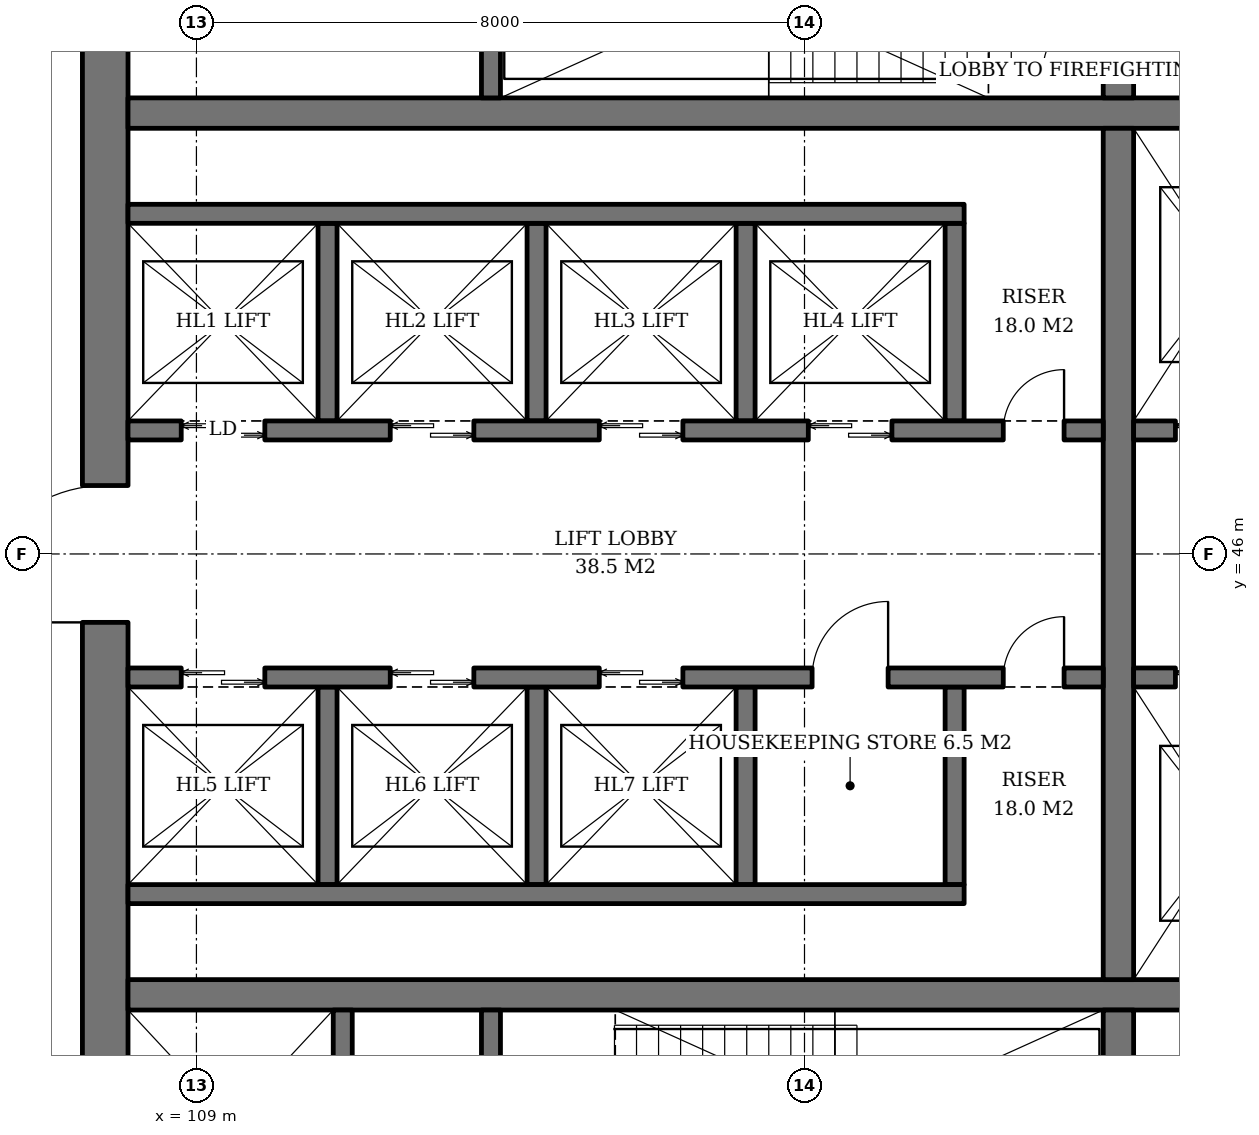
"""IFC4 building model, lengths in metres.
Left out: names, types, materials, properties, quantities, classifications, styles, units other than length and angle.
Written with IfcOpenShell. Run it as: python <this file> out.ifc"""

import sys

from ifc_helpers import new_model, si_unit, direction, frame, frame_2d, origin, place, context, subcontext, project, spatial, rectangle, extrude, element, fill, save


model = new_model("IFC4")
c1 = context("Model", 3, precision=1e-05, world=origin(), true_north=direction((0.0, 1.0)))
c2 = subcontext(c1, "Body", "Model", "MODEL_VIEW")
j1 = project(units=[si_unit("LENGTHUNIT", "METRE"), si_unit("PLANEANGLEUNIT", "RADIAN")], contexts=[c1])
p1 = place(None, origin())
s1 = spatial("IfcSite", under=j1, at=p1, CompositionType="ELEMENT")
p2 = place(p1, origin())
s2 = spatial("IfcBuilding", under=s1, at=p2, CompositionType="ELEMENT")
p3 = place(p2, frame((0.0, 0.0, 104.6)))
s3 = spatial("IfcBuildingStorey", under=s2, at=p3, CompositionType="ELEMENT", Elevation=104.6)
p4 = place(p3, frame((107.8, 37.1, 0.0), z_axis=(0.0, 0.0, 1.0), x_axis=(0.0, 1.0, 0.0)))
e1 = element("IfcWall", 1, at=p4, inside=s3, PredefinedType="SHEAR", context=c2, shape_type="SweptSolid", body=[
    extrude(rectangle(XDim=17.8, YDim=0.6, at=frame_2d((8.9, 0.0))), origin(), (0.0, 0.0, 1.0), 3.8),
])
p5 = place(p4, frame((8.0, 0.0, 0.0)))
e2 = element("IfcOpeningElement", 2, at=p5, cuts=e1, PredefinedType="OPENING", context=c2, shape_type="SweptSolid", body=[
    extrude(rectangle(XDim=1.8, YDim=2.4, at=frame_2d((0.9, 1.2))), frame((0.0, 0.31, 0.0), z_axis=(0.0, -1.0, 0.0), x_axis=(1.0, 0.0, 0.0)), (0.0, 0.0, 1.0), 0.62),
])
for number, where, z_axis, x_axis in (
    (3, (108.1, 40.2, 0.0), (0.0, 0.0, 1.0), (1.0, 0.0, 0.0)),
    (4, (108.1, 51.8, 0.0), (0.0, 0.0, 1.0), (1.0, 0.0, 0.0)),
):
    element("IfcWall", number, at=place(p3, frame(where, z_axis=z_axis, x_axis=x_axis)), inside=s3, PredefinedType="SHEAR", context=c2, shape_type="SweptSolid", body=[
        extrude(rectangle(XDim=17.8, YDim=0.4, at=frame_2d((8.9, 0.0))), origin(), (0.0, 0.0, 1.0), 3.8),
    ])
p6 = place(p3, frame((121.13, 37.1, 0.0), z_axis=(0.0, 0.0, 1.0), x_axis=(0.0, 1.0, 0.0)))
e5 = element("IfcWall", 5, at=p6, inside=s3, PredefinedType="SHEAR", context=c2, shape_type="SweptSolid", body=[
    extrude(rectangle(XDim=2.9, YDim=0.4, at=frame_2d((1.45, 0.0))), origin(), (0.0, 0.0, 1.0), 3.8),
])
p7 = place(p3, frame((121.13, 40.4, 0.0), z_axis=(0.0, 0.0, 1.0), x_axis=(0.0, 1.0, 0.0)))
e6 = element("IfcWall", 6, at=p7, inside=s3, PredefinedType="SHEAR", context=c2, shape_type="SweptSolid", body=[
    extrude(rectangle(XDim=11.2, YDim=0.4, at=frame_2d((5.6, 0.0))), origin(), (0.0, 0.0, 1.0), 3.8),
])
p8 = place(p3, frame((121.13, 52.0, 0.0), z_axis=(0.0, 0.0, 1.0), x_axis=(0.0, 1.0, 0.0)))
e7 = element("IfcWall", 7, at=p8, inside=s3, PredefinedType="SHEAR", context=c2, shape_type="SweptSolid", body=[
    extrude(rectangle(XDim=2.9, YDim=0.4, at=frame_2d((1.45, 0.0))), origin(), (0.0, 0.0, 1.0), 3.8),
])
p9 = place(p8, frame((0.3, 0.0, 0.0)))
e8 = element("IfcOpeningElement", 8, at=p9, cuts=e7, PredefinedType="OPENING", context=c2, shape_type="SweptSolid", body=[
    extrude(rectangle(XDim=1.0, YDim=2.1, at=frame_2d((0.5, 1.05))), frame((0.0, 0.21, 0.0), z_axis=(0.0, -1.0, 0.0), x_axis=(1.0, 0.0, 0.0)), (0.0, 0.0, 1.0), 0.42),
])
p10 = place(p3, frame((110.925, 37.1, 0.0), z_axis=(0.0, 0.0, 1.0), x_axis=(0.0, 1.0, 0.0)))
e9 = element("IfcWall", 9, at=p10, inside=s3, PredefinedType="SHEAR", context=c2, shape_type="SweptSolid", body=[
    extrude(rectangle(XDim=2.9, YDim=0.25, at=frame_2d((1.45, 0.0))), origin(), (0.0, 0.0, 1.0), 3.8),
])
p11 = place(p10, frame((0.8, 0.0, 0.0)))
e10 = element("IfcOpeningElement", 10, at=p11, cuts=e9, PredefinedType="OPENING", context=c2, shape_type="SweptSolid", body=[
    extrude(rectangle(XDim=1.3, YDim=2.2, at=frame_2d((0.65, 1.1))), frame((0.0, 0.135, 0.0), z_axis=(0.0, -1.0, 0.0), x_axis=(1.0, 0.0, 0.0)), (0.0, 0.0, 1.0), 0.27),
])
p12 = place(p3, frame((112.875, 37.1, 0.0), z_axis=(0.0, 0.0, 1.0), x_axis=(0.0, 1.0, 0.0)))
e11 = element("IfcWall", 11, at=p12, inside=s3, PredefinedType="SHEAR", context=c2, shape_type="SweptSolid", body=[
    extrude(rectangle(XDim=2.9, YDim=0.25, at=frame_2d((1.45, 0.0))), origin(), (0.0, 0.0, 1.0), 3.8),
])
p13 = place(p12, frame((0.75, 0.0, 0.0)))
e12 = element("IfcOpeningElement", 12, at=p13, cuts=e11, PredefinedType="OPENING", context=c2, shape_type="SweptSolid", body=[
    extrude(rectangle(XDim=1.2, YDim=2.1, at=frame_2d((0.6, 1.05))), frame((0.0, 0.135, 0.0), z_axis=(0.0, -1.0, 0.0), x_axis=(1.0, 0.0, 0.0)), (0.0, 0.0, 1.0), 0.27),
])
p14 = place(p3, frame((112.875, 52.0, 0.0), z_axis=(0.0, 0.0, 1.0), x_axis=(0.0, 1.0, 0.0)))
e13 = element("IfcWall", 13, at=p14, inside=s3, PredefinedType="SHEAR", context=c2, shape_type="SweptSolid", body=[
    extrude(rectangle(XDim=2.9, YDim=0.25, at=frame_2d((1.45, 0.0))), origin(), (0.0, 0.0, 1.0), 3.8),
])
for number, where, z_axis, x_axis in (
    (14, (110.725, 47.75, 0.0), (0.0, 0.0, 1.0), (0.0, 1.0, 0.0)),
    (15, (113.475, 47.75, 0.0), (0.0, 0.0, 1.0), (0.0, 1.0, 0.0)),
    (16, (116.225, 47.75, 0.0), (0.0, 0.0, 1.0), (0.0, 1.0, 0.0)),
    (17, (118.975, 47.75, 0.0), (0.0, 0.0, 1.0), (0.0, 1.0, 0.0)),
):
    element("IfcWall", number, at=place(p3, frame(where, z_axis=z_axis, x_axis=x_axis)), inside=s3, PredefinedType="SHEAR", context=c2, shape_type="SweptSolid", body=[
        extrude(rectangle(XDim=2.6, YDim=0.25, at=frame_2d((1.3, 0.0))), origin(), (0.0, 0.0, 1.0), 3.8),
    ])
p15 = place(p3, frame((108.1, 50.475, 0.0), z_axis=(0.0, 0.0, 1.0), x_axis=(1.0, 0.0, 0.0)))
e18 = element("IfcWall", 18, at=p15, inside=s3, PredefinedType="SHEAR", context=c2, shape_type="SweptSolid", body=[
    extrude(rectangle(XDim=11.0, YDim=0.25, at=frame_2d((5.5, 0.0))), origin(), (0.0, 0.0, 1.0), 3.8),
])
p16 = place(p3, frame((108.1, 47.625, 0.0), z_axis=(0.0, 0.0, 1.0), x_axis=(1.0, 0.0, 0.0)))
e19 = element("IfcWall", 19, at=p16, inside=s3, PredefinedType="SHEAR", context=c2, shape_type="SweptSolid", body=[
    extrude(rectangle(XDim=12.83, YDim=0.25, at=frame_2d((6.415, 0.0))), origin(), (0.0, 0.0, 1.0), 3.8),
])
p17 = place(p16, frame((0.7, 0.0, 0.0)))
e20 = element("IfcOpeningElement", 20, at=p17, cuts=e19, PredefinedType="OPENING", context=c2, shape_type="SweptSolid", body=[
    extrude(rectangle(XDim=1.1, YDim=2.2, at=frame_2d((0.55, 1.1))), frame((0.0, 0.135, 0.0), z_axis=(0.0, -1.0, 0.0), x_axis=(1.0, 0.0, 0.0)), (0.0, 0.0, 1.0), 0.27),
])
p18 = place(p16, frame((3.45, 0.0, 0.0)))
e21 = element("IfcOpeningElement", 21, at=p18, cuts=e19, PredefinedType="OPENING", context=c2, shape_type="SweptSolid", body=[
    extrude(rectangle(XDim=1.1, YDim=2.2, at=frame_2d((0.55, 1.1))), frame((0.0, 0.135, 0.0), z_axis=(0.0, -1.0, 0.0), x_axis=(1.0, 0.0, 0.0)), (0.0, 0.0, 1.0), 0.27),
])
p19 = place(p16, frame((6.2, 0.0, 0.0)))
e22 = element("IfcOpeningElement", 22, at=p19, cuts=e19, PredefinedType="OPENING", context=c2, shape_type="SweptSolid", body=[
    extrude(rectangle(XDim=1.1, YDim=2.2, at=frame_2d((0.55, 1.1))), frame((0.0, 0.135, 0.0), z_axis=(0.0, -1.0, 0.0), x_axis=(1.0, 0.0, 0.0)), (0.0, 0.0, 1.0), 0.27),
])
p20 = place(p16, frame((8.95, 0.0, 0.0)))
e23 = element("IfcOpeningElement", 23, at=p20, cuts=e19, PredefinedType="OPENING", context=c2, shape_type="SweptSolid", body=[
    extrude(rectangle(XDim=1.1, YDim=2.2, at=frame_2d((0.55, 1.1))), frame((0.0, 0.135, 0.0), z_axis=(0.0, -1.0, 0.0), x_axis=(1.0, 0.0, 0.0)), (0.0, 0.0, 1.0), 0.27),
])
p21 = place(p16, frame((11.515, 0.0, 0.0)))
e24 = element("IfcOpeningElement", 24, at=p21, cuts=e19, PredefinedType="OPENING", context=c2, shape_type="SweptSolid", body=[
    extrude(rectangle(XDim=0.8, YDim=2.0, at=frame_2d((0.4, 1.0))), frame((0.0, 0.135, 0.0), z_axis=(0.0, -1.0, 0.0), x_axis=(1.0, 0.0, 0.0)), (0.0, 0.0, 1.0), 0.27),
])
for number, where, z_axis, x_axis in (
    (25, (110.725, 44.25, 0.0), (0.0, 0.0, 1.0), (0.0, -1.0, 0.0)),
    (26, (113.475, 44.25, 0.0), (0.0, 0.0, 1.0), (0.0, -1.0, 0.0)),
    (27, (116.225, 44.25, 0.0), (0.0, 0.0, 1.0), (0.0, -1.0, 0.0)),
    (28, (118.975, 44.25, 0.0), (0.0, 0.0, 1.0), (0.0, -1.0, 0.0)),
):
    element("IfcWall", number, at=place(p3, frame(where, z_axis=z_axis, x_axis=x_axis)), inside=s3, PredefinedType="SHEAR", context=c2, shape_type="SweptSolid", body=[
        extrude(rectangle(XDim=2.6, YDim=0.25, at=frame_2d((1.3, 0.0))), origin(), (0.0, 0.0, 1.0), 3.8),
    ])
p22 = place(p3, frame((108.1, 41.525, 0.0), z_axis=(0.0, 0.0, 1.0), x_axis=(1.0, 0.0, 0.0)))
e29 = element("IfcWall", 29, at=p22, inside=s3, PredefinedType="SHEAR", context=c2, shape_type="SweptSolid", body=[
    extrude(rectangle(XDim=11.0, YDim=0.25, at=frame_2d((5.5, 0.0))), origin(), (0.0, 0.0, 1.0), 3.8),
])
p23 = place(p3, frame((108.1, 44.375, 0.0), z_axis=(0.0, 0.0, 1.0), x_axis=(1.0, 0.0, 0.0)))
e30 = element("IfcWall", 30, at=p23, inside=s3, PredefinedType="SHEAR", context=c2, shape_type="SweptSolid", body=[
    extrude(rectangle(XDim=12.83, YDim=0.25, at=frame_2d((6.415, 0.0))), origin(), (0.0, 0.0, 1.0), 3.8),
])
p24 = place(p23, frame((0.7, 0.0, 0.0)))
e31 = element("IfcOpeningElement", 31, at=p24, cuts=e30, PredefinedType="OPENING", context=c2, shape_type="SweptSolid", body=[
    extrude(rectangle(XDim=1.1, YDim=2.2, at=frame_2d((0.55, 1.1))), frame((0.0, 0.135, 0.0), z_axis=(0.0, -1.0, 0.0), x_axis=(1.0, 0.0, 0.0)), (0.0, 0.0, 1.0), 0.27),
])
p25 = place(p23, frame((3.45, 0.0, 0.0)))
e32 = element("IfcOpeningElement", 32, at=p25, cuts=e30, PredefinedType="OPENING", context=c2, shape_type="SweptSolid", body=[
    extrude(rectangle(XDim=1.1, YDim=2.2, at=frame_2d((0.55, 1.1))), frame((0.0, 0.135, 0.0), z_axis=(0.0, -1.0, 0.0), x_axis=(1.0, 0.0, 0.0)), (0.0, 0.0, 1.0), 0.27),
])
p26 = place(p23, frame((6.2, 0.0, 0.0)))
e33 = element("IfcOpeningElement", 33, at=p26, cuts=e30, PredefinedType="OPENING", context=c2, shape_type="SweptSolid", body=[
    extrude(rectangle(XDim=1.1, YDim=2.2, at=frame_2d((0.55, 1.1))), frame((0.0, 0.135, 0.0), z_axis=(0.0, -1.0, 0.0), x_axis=(1.0, 0.0, 0.0)), (0.0, 0.0, 1.0), 0.27),
])
p27 = place(p23, frame((9.0, 0.0, 0.0)))
e34 = element("IfcOpeningElement", 34, at=p27, cuts=e30, PredefinedType="OPENING", context=c2, shape_type="SweptSolid", body=[
    extrude(rectangle(XDim=1.0, YDim=2.1, at=frame_2d((0.5, 1.05))), frame((0.0, 0.135, 0.0), z_axis=(0.0, -1.0, 0.0), x_axis=(1.0, 0.0, 0.0)), (0.0, 0.0, 1.0), 0.27),
])
p28 = place(p23, frame((11.515, 0.0, 0.0)))
e35 = element("IfcOpeningElement", 35, at=p28, cuts=e30, PredefinedType="OPENING", context=c2, shape_type="SweptSolid", body=[
    extrude(rectangle(XDim=0.8, YDim=2.0, at=frame_2d((0.4, 1.0))), frame((0.0, 0.135, 0.0), z_axis=(0.0, -1.0, 0.0), x_axis=(1.0, 0.0, 0.0)), (0.0, 0.0, 1.0), 0.27),
])
p29 = place(p3, frame((121.33, 47.625, 0.0), z_axis=(0.0, 0.0, 1.0), x_axis=(1.0, 0.0, 0.0)))
e36 = element("IfcWall", 36, at=p29, inside=s3, PredefinedType="SHEAR", context=c2, shape_type="SweptSolid", body=[
    extrude(rectangle(XDim=4.57, YDim=0.25, at=frame_2d((2.285, 0.0))), origin(), (0.0, 0.0, 1.0), 3.8),
])
p30 = place(p29, frame((0.55, 0.0, 0.0)))
e37 = element("IfcOpeningElement", 37, at=p30, cuts=e36, PredefinedType="OPENING", context=c2, shape_type="SweptSolid", body=[
    extrude(rectangle(XDim=1.4, YDim=2.4, at=frame_2d((0.7, 1.2))), frame((0.0, 0.135, 0.0), z_axis=(0.0, -1.0, 0.0), x_axis=(1.0, 0.0, 0.0)), (0.0, 0.0, 1.0), 0.27),
])
p31 = place(p29, frame((3.26, 0.0, 0.0)))
e38 = element("IfcOpeningElement", 38, at=p31, cuts=e36, PredefinedType="OPENING", context=c2, shape_type="SweptSolid", body=[
    extrude(rectangle(XDim=0.8, YDim=2.0, at=frame_2d((0.4, 1.0))), frame((0.0, 0.135, 0.0), z_axis=(0.0, -1.0, 0.0), x_axis=(1.0, 0.0, 0.0)), (0.0, 0.0, 1.0), 0.27),
])
p32 = place(p3, frame((121.33, 44.375, 0.0), z_axis=(0.0, 0.0, 1.0), x_axis=(1.0, 0.0, 0.0)))
e39 = element("IfcWall", 39, at=p32, inside=s3, PredefinedType="SHEAR", context=c2, shape_type="SweptSolid", body=[
    extrude(rectangle(XDim=4.57, YDim=0.25, at=frame_2d((2.285, 0.0))), origin(), (0.0, 0.0, 1.0), 3.8),
])
p33 = place(p32, frame((0.55, 0.0, 0.0)))
e40 = element("IfcOpeningElement", 40, at=p33, cuts=e39, PredefinedType="OPENING", context=c2, shape_type="SweptSolid", body=[
    extrude(rectangle(XDim=1.4, YDim=2.4, at=frame_2d((0.7, 1.2))), frame((0.0, 0.135, 0.0), z_axis=(0.0, -1.0, 0.0), x_axis=(1.0, 0.0, 0.0)), (0.0, 0.0, 1.0), 0.27),
])
p34 = place(p32, frame((3.26, 0.0, 0.0)))
e41 = element("IfcOpeningElement", 41, at=p34, cuts=e39, PredefinedType="OPENING", context=c2, shape_type="SweptSolid", body=[
    extrude(rectangle(XDim=0.8, YDim=2.0, at=frame_2d((0.4, 1.0))), frame((0.0, 0.135, 0.0), z_axis=(0.0, -1.0, 0.0), x_axis=(1.0, 0.0, 0.0)), (0.0, 0.0, 1.0), 0.27),
])
p35 = place(p17, origin())
e42 = element("IfcDoor", 42, at=p35, inside=s3, OperationType="DOUBLE_DOOR_SLIDING", PredefinedType="DOOR", context=c2, shape_type="SweptSolid", body=[
    extrude(rectangle(XDim=1.1, YDim=2.2, at=frame_2d((0.55, 1.1))), frame((0.0, 0.025, 0.0), z_axis=(0.0, -1.0, 0.0), x_axis=(1.0, 0.0, 0.0)), (0.0, 0.0, 1.0), 0.05),
])
fill(e20, e42)
p36 = place(p18, origin())
e43 = element("IfcDoor", 43, at=p36, inside=s3, OperationType="DOUBLE_DOOR_SLIDING", PredefinedType="DOOR", context=c2, shape_type="SweptSolid", body=[
    extrude(rectangle(XDim=1.1, YDim=2.2, at=frame_2d((0.55, 1.1))), frame((0.0, 0.025, 0.0), z_axis=(0.0, -1.0, 0.0), x_axis=(1.0, 0.0, 0.0)), (0.0, 0.0, 1.0), 0.05),
])
fill(e21, e43)
p37 = place(p19, origin())
e44 = element("IfcDoor", 44, at=p37, inside=s3, OperationType="DOUBLE_DOOR_SLIDING", PredefinedType="DOOR", context=c2, shape_type="SweptSolid", body=[
    extrude(rectangle(XDim=1.1, YDim=2.2, at=frame_2d((0.55, 1.1))), frame((0.0, 0.025, 0.0), z_axis=(0.0, -1.0, 0.0), x_axis=(1.0, 0.0, 0.0)), (0.0, 0.0, 1.0), 0.05),
])
fill(e22, e44)
p38 = place(p20, origin())
e45 = element("IfcDoor", 45, at=p38, inside=s3, OperationType="DOUBLE_DOOR_SLIDING", PredefinedType="DOOR", context=c2, shape_type="SweptSolid", body=[
    extrude(rectangle(XDim=1.1, YDim=2.2, at=frame_2d((0.55, 1.1))), frame((0.0, 0.025, 0.0), z_axis=(0.0, -1.0, 0.0), x_axis=(1.0, 0.0, 0.0)), (0.0, 0.0, 1.0), 0.05),
])
fill(e23, e45)
p39 = place(p21, origin())
e46 = element("IfcDoor", 46, at=p39, inside=s3, OperationType="SINGLE_SWING_RIGHT", PredefinedType="DOOR", context=c2, shape_type="SweptSolid", body=[
    extrude(rectangle(XDim=0.8, YDim=2.0, at=frame_2d((0.4, 1.0))), frame((0.0, 0.025, 0.0), z_axis=(0.0, -1.0, 0.0), x_axis=(1.0, 0.0, 0.0)), (0.0, 0.0, 1.0), 0.05),
])
fill(e24, e46)
p40 = place(p24, origin())
e47 = element("IfcDoor", 47, at=p40, inside=s3, OperationType="DOUBLE_DOOR_SLIDING", PredefinedType="DOOR", context=c2, shape_type="SweptSolid", body=[
    extrude(rectangle(XDim=1.1, YDim=2.2, at=frame_2d((0.55, 1.1))), frame((0.0, 0.025, 0.0), z_axis=(0.0, -1.0, 0.0), x_axis=(1.0, 0.0, 0.0)), (0.0, 0.0, 1.0), 0.05),
])
fill(e31, e47)
p41 = place(p25, origin())
e48 = element("IfcDoor", 48, at=p41, inside=s3, OperationType="DOUBLE_DOOR_SLIDING", PredefinedType="DOOR", context=c2, shape_type="SweptSolid", body=[
    extrude(rectangle(XDim=1.1, YDim=2.2, at=frame_2d((0.55, 1.1))), frame((0.0, 0.025, 0.0), z_axis=(0.0, -1.0, 0.0), x_axis=(1.0, 0.0, 0.0)), (0.0, 0.0, 1.0), 0.05),
])
fill(e32, e48)
p42 = place(p26, origin())
e49 = element("IfcDoor", 49, at=p42, inside=s3, OperationType="DOUBLE_DOOR_SLIDING", PredefinedType="DOOR", context=c2, shape_type="SweptSolid", body=[
    extrude(rectangle(XDim=1.1, YDim=2.2, at=frame_2d((0.55, 1.1))), frame((0.0, 0.025, 0.0), z_axis=(0.0, -1.0, 0.0), x_axis=(1.0, 0.0, 0.0)), (0.0, 0.0, 1.0), 0.05),
])
fill(e33, e49)
p43 = place(p27, origin())
e50 = element("IfcDoor", 50, at=p43, inside=s3, OperationType="SINGLE_SWING_RIGHT", PredefinedType="DOOR", context=c2, shape_type="SweptSolid", body=[
    extrude(rectangle(XDim=1.0, YDim=2.1, at=frame_2d((0.5, 1.05))), frame((0.0, 0.025, 0.0), z_axis=(0.0, -1.0, 0.0), x_axis=(1.0, 0.0, 0.0)), (0.0, 0.0, 1.0), 0.05),
])
fill(e34, e50)
p44 = place(p28, origin())
e51 = element("IfcDoor", 51, at=p44, inside=s3, OperationType="SINGLE_SWING_RIGHT", PredefinedType="DOOR", context=c2, shape_type="SweptSolid", body=[
    extrude(rectangle(XDim=0.8, YDim=2.0, at=frame_2d((0.4, 1.0))), frame((0.0, 0.025, 0.0), z_axis=(0.0, -1.0, 0.0), x_axis=(1.0, 0.0, 0.0)), (0.0, 0.0, 1.0), 0.05),
])
fill(e35, e51)
p45 = place(p30, origin())
e52 = element("IfcDoor", 52, at=p45, inside=s3, OperationType="DOUBLE_DOOR_SLIDING", PredefinedType="DOOR", context=c2, shape_type="SweptSolid", body=[
    extrude(rectangle(XDim=1.4, YDim=2.4, at=frame_2d((0.7, 1.2))), frame((0.0, 0.025, 0.0), z_axis=(0.0, -1.0, 0.0), x_axis=(1.0, 0.0, 0.0)), (0.0, 0.0, 1.0), 0.05),
])
fill(e37, e52)
p46 = place(p33, origin())
e53 = element("IfcDoor", 53, at=p46, inside=s3, OperationType="DOUBLE_DOOR_SLIDING", PredefinedType="DOOR", context=c2, shape_type="SweptSolid", body=[
    extrude(rectangle(XDim=1.4, YDim=2.4, at=frame_2d((0.7, 1.2))), frame((0.0, 0.025, 0.0), z_axis=(0.0, -1.0, 0.0), x_axis=(1.0, 0.0, 0.0)), (0.0, 0.0, 1.0), 0.05),
])
fill(e40, e53)
p47 = place(p9, origin())
e54 = element("IfcDoor", 54, at=p47, inside=s3, OperationType="SINGLE_SWING_LEFT", PredefinedType="DOOR", context=c2, shape_type="SweptSolid", body=[
    extrude(rectangle(XDim=1.0, YDim=2.1, at=frame_2d((0.5, 1.05))), frame((0.0, 0.025, 0.0), z_axis=(0.0, -1.0, 0.0), x_axis=(1.0, 0.0, 0.0)), (0.0, 0.0, 1.0), 0.05),
])
fill(e8, e54)
p48 = place(p5, origin())
e55 = element("IfcDoor", 55, at=p48, inside=s3, OperationType="DOUBLE_DOOR_SINGLE_SWING", PredefinedType="DOOR", context=c2, shape_type="SweptSolid", body=[
    extrude(rectangle(XDim=1.8, YDim=2.4, at=frame_2d((0.9, 1.2))), frame((0.0, 0.025, 0.0), z_axis=(0.0, -1.0, 0.0), x_axis=(1.0, 0.0, 0.0)), (0.0, 0.0, 1.0), 0.05),
])
fill(e2, e55)
save(model, sys.argv[1])
